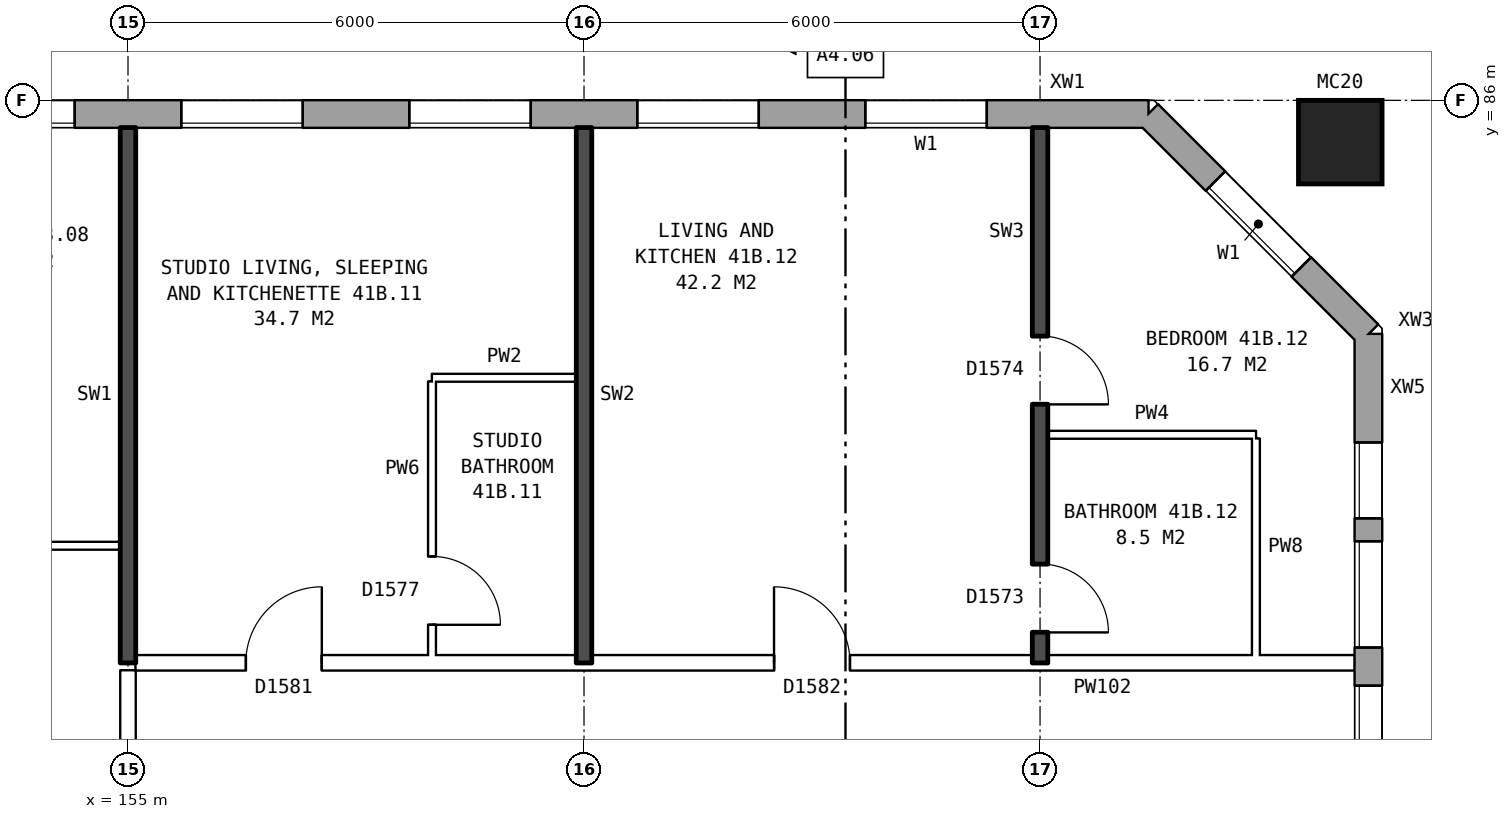
"""IFC4 building model, lengths in metres.
Left out: names, types, materials, properties, quantities, classifications, styles, units other than length and angle.
Written with IfcOpenShell. Run it as: python <this file> out.ifc"""

import sys

from ifc_helpers import new_model, si_unit, direction, frame, frame_2d, origin, origin_2d, place, context, subcontext, project, spatial, rectangle, hollow_rectangle, extrude, element, fill, save


model = new_model("IFC4")
c1 = context("Model", 3, precision=1e-05, world=origin(), true_north=direction((0.0, 1.0)))
c2 = subcontext(c1, "Body", "Model", "MODEL_VIEW")
j1 = project(units=[si_unit("LENGTHUNIT", "METRE"), si_unit("PLANEANGLEUNIT", "RADIAN")], contexts=[c1])
p1 = place(None, origin())
s1 = spatial("IfcSite", under=j1, at=p1, CompositionType="ELEMENT")
p2 = place(p1, origin())
s2 = spatial("IfcBuilding", under=s1, at=p2, CompositionType="ELEMENT")
p3 = place(p2, frame((0.0, 0.0, 148.5)))
s3 = spatial("IfcBuildingStorey", under=s2, at=p3, CompositionType="ELEMENT", Elevation=148.5)
p4 = place(p3, frame((170.95, 85.45, 0.0), z_axis=(0.0, 0.0, 1.0), x_axis=(1.0, 0.0, 0.0)))
e1 = element("IfcColumn", 1, at=p4, inside=s3, PredefinedType="COLUMN", context=c2, shape_type="SweptSolid", body=[
    extrude(hollow_rectangle(XDim=1.1, YDim=1.1, WallThickness=0.06, at=origin_2d()), origin(), (0.0, 0.0, 1.0), 3.1),
])
p5 = place(p3, frame((171.32, 57.075, 0.0), z_axis=(0.0, 0.0, 1.0), x_axis=(0.0, 1.0, 0.0)))
e2 = element("IfcWall", 2, at=p5, inside=s3, PredefinedType="STANDARD", context=c2, shape_type="SweptSolid", body=[
    extrude(rectangle(XDim=25.851, YDim=0.36, at=frame_2d((12.925, 0.0))), origin(), (0.0, 0.0, 1.0), 2.85),
])
p6 = place(p5, frame((1.4, 0.0, 0.8)))
e3 = element("IfcOpeningElement", 3, at=p6, cuts=e2, PredefinedType="OPENING", context=c2, shape_type="SweptSolid", body=[
    extrude(rectangle(XDim=1.0, YDim=1.2, at=frame_2d((0.5, 0.6))), frame((0.0, 0.19, 0.0), z_axis=(0.0, -1.0, 0.0), x_axis=(1.0, 0.0, 0.0)), (0.0, 0.0, 1.0), 0.38),
])
p7 = place(p5, frame((4.625, 0.0, 0.8)))
e4 = element("IfcOpeningElement", 4, at=p7, cuts=e2, PredefinedType="OPENING", context=c2, shape_type="SweptSolid", body=[
    extrude(rectangle(XDim=1.6, YDim=1.8, at=frame_2d((0.8, 0.9))), frame((0.0, 0.19, 0.0), z_axis=(0.0, -1.0, 0.0), x_axis=(1.0, 0.0, 0.0)), (0.0, 0.0, 1.0), 0.38),
])
p8 = place(p5, frame((7.625, 0.0, 0.8)))
e5 = element("IfcOpeningElement", 5, at=p8, cuts=e2, PredefinedType="OPENING", context=c2, shape_type="SweptSolid", body=[
    extrude(rectangle(XDim=1.6, YDim=1.8, at=frame_2d((0.8, 0.9))), frame((0.0, 0.19, 0.0), z_axis=(0.0, -1.0, 0.0), x_axis=(1.0, 0.0, 0.0)), (0.0, 0.0, 1.0), 0.38),
])
p9 = place(p5, frame((10.625, 0.0, 0.8)))
e6 = element("IfcOpeningElement", 6, at=p9, cuts=e2, PredefinedType="OPENING", context=c2, shape_type="SweptSolid", body=[
    extrude(rectangle(XDim=1.6, YDim=1.8, at=frame_2d((0.8, 0.9))), frame((0.0, 0.19, 0.0), z_axis=(0.0, -1.0, 0.0), x_axis=(1.0, 0.0, 0.0)), (0.0, 0.0, 1.0), 0.38),
])
p10 = place(p5, frame((13.625, 0.0, 0.8)))
e7 = element("IfcOpeningElement", 7, at=p10, cuts=e2, PredefinedType="OPENING", context=c2, shape_type="SweptSolid", body=[
    extrude(rectangle(XDim=1.6, YDim=1.8, at=frame_2d((0.8, 0.9))), frame((0.0, 0.19, 0.0), z_axis=(0.0, -1.0, 0.0), x_axis=(1.0, 0.0, 0.0)), (0.0, 0.0, 1.0), 0.38),
])
p11 = place(p5, frame((16.625, 0.0, 0.8)))
e8 = element("IfcOpeningElement", 8, at=p11, cuts=e2, PredefinedType="OPENING", context=c2, shape_type="SweptSolid", body=[
    extrude(rectangle(XDim=1.6, YDim=1.8, at=frame_2d((0.8, 0.9))), frame((0.0, 0.19, 0.0), z_axis=(0.0, -1.0, 0.0), x_axis=(1.0, 0.0, 0.0)), (0.0, 0.0, 1.0), 0.38),
])
p12 = place(p5, frame((19.625, 0.0, 0.8)))
e9 = element("IfcOpeningElement", 9, at=p12, cuts=e2, PredefinedType="OPENING", context=c2, shape_type="SweptSolid", body=[
    extrude(rectangle(XDim=1.6, YDim=1.8, at=frame_2d((0.8, 0.9))), frame((0.0, 0.19, 0.0), z_axis=(0.0, -1.0, 0.0), x_axis=(1.0, 0.0, 0.0)), (0.0, 0.0, 1.0), 0.38),
])
p13 = place(p5, frame((21.725, 0.0, 0.8)))
e10 = element("IfcOpeningElement", 10, at=p13, cuts=e2, PredefinedType="OPENING", context=c2, shape_type="SweptSolid", body=[
    extrude(rectangle(XDim=1.4, YDim=1.8, at=frame_2d((0.7, 0.9))), frame((0.0, 0.19, 0.0), z_axis=(0.0, -1.0, 0.0), x_axis=(1.0, 0.0, 0.0)), (0.0, 0.0, 1.0), 0.38),
])
p14 = place(p5, frame((2.7, 0.0, 0.8)))
e11 = element("IfcOpeningElement", 11, at=p14, cuts=e2, PredefinedType="OPENING", context=c2, shape_type="SweptSolid", body=[
    extrude(rectangle(XDim=1.4, YDim=1.8, at=frame_2d((0.7, 0.9))), frame((0.0, 0.19, 0.0), z_axis=(0.0, -1.0, 0.0), x_axis=(1.0, 0.0, 0.0)), (0.0, 0.0, 1.0), 0.38),
])
p15 = place(p5, frame((23.425, 0.0, 0.8)))
e12 = element("IfcOpeningElement", 12, at=p15, cuts=e2, PredefinedType="OPENING", context=c2, shape_type="SweptSolid", body=[
    extrude(rectangle(XDim=1.0, YDim=1.2, at=frame_2d((0.5, 0.6))), frame((0.0, 0.19, 0.0), z_axis=(0.0, -1.0, 0.0), x_axis=(1.0, 0.0, 0.0)), (0.0, 0.0, 1.0), 0.38),
])
p16 = place(p3, frame((171.32, 82.925, 0.0), z_axis=(0.0, 0.0, 1.0), x_axis=(-0.707106781187, 0.707106781187, 0.0)))
e13 = element("IfcWall", 13, at=p16, inside=s3, PredefinedType="STANDARD", context=c2, shape_type="SweptSolid", body=[
    extrude(rectangle(XDim=4.094, YDim=0.36, at=frame_2d((2.047, 0.0))), origin(), (0.0, 0.0, 1.0), 2.85),
])
p17 = place(p16, frame((1.247, 0.0, 0.8)))
e14 = element("IfcOpeningElement", 14, at=p17, cuts=e13, PredefinedType="OPENING", context=c2, shape_type="SweptSolid", body=[
    extrude(rectangle(XDim=1.6, YDim=1.8, at=frame_2d((0.8, 0.9))), frame((0.0, 0.19, 0.0), z_axis=(0.0, -1.0, 0.0), x_axis=(1.0, 0.0, 0.0)), (0.0, 0.0, 1.0), 0.38),
])
p18 = place(p3, frame((168.425, 85.82, 0.0), z_axis=(0.0, 0.0, 1.0), x_axis=(-1.0, 0.0, 0.0)))
e15 = element("IfcWall", 15, at=p18, inside=s3, PredefinedType="STANDARD", context=c2, shape_type="SweptSolid", body=[
    extrude(rectangle(XDim=34.351, YDim=0.36, at=frame_2d((17.175, 0.0))), origin(), (0.0, 0.0, 1.0), 2.85),
])
p19 = place(p18, frame((2.125, 0.0, 0.8)))
e16 = element("IfcOpeningElement", 16, at=p19, cuts=e15, PredefinedType="OPENING", context=c2, shape_type="SweptSolid", body=[
    extrude(rectangle(XDim=1.6, YDim=1.8, at=frame_2d((0.8, 0.9))), frame((0.0, 0.19, 0.0), z_axis=(0.0, -1.0, 0.0), x_axis=(1.0, 0.0, 0.0)), (0.0, 0.0, 1.0), 0.38),
])
p20 = place(p18, frame((5.125, 0.0, 0.8)))
e17 = element("IfcOpeningElement", 17, at=p20, cuts=e15, PredefinedType="OPENING", context=c2, shape_type="SweptSolid", body=[
    extrude(rectangle(XDim=1.6, YDim=1.8, at=frame_2d((0.8, 0.9))), frame((0.0, 0.19, 0.0), z_axis=(0.0, -1.0, 0.0), x_axis=(1.0, 0.0, 0.0)), (0.0, 0.0, 1.0), 0.38),
])
p21 = place(p18, frame((8.125, 0.0, 0.8)))
e18 = element("IfcOpeningElement", 18, at=p21, cuts=e15, PredefinedType="OPENING", context=c2, shape_type="SweptSolid", body=[
    extrude(rectangle(XDim=1.6, YDim=1.8, at=frame_2d((0.8, 0.9))), frame((0.0, 0.19, 0.0), z_axis=(0.0, -1.0, 0.0), x_axis=(1.0, 0.0, 0.0)), (0.0, 0.0, 1.0), 0.38),
])
p22 = place(p18, frame((11.125, 0.0, 0.8)))
e19 = element("IfcOpeningElement", 19, at=p22, cuts=e15, PredefinedType="OPENING", context=c2, shape_type="SweptSolid", body=[
    extrude(rectangle(XDim=1.6, YDim=1.8, at=frame_2d((0.8, 0.9))), frame((0.0, 0.19, 0.0), z_axis=(0.0, -1.0, 0.0), x_axis=(1.0, 0.0, 0.0)), (0.0, 0.0, 1.0), 0.38),
])
p23 = place(p18, frame((14.125, 0.0, 0.8)))
e20 = element("IfcOpeningElement", 20, at=p23, cuts=e15, PredefinedType="OPENING", context=c2, shape_type="SweptSolid", body=[
    extrude(rectangle(XDim=1.6, YDim=1.8, at=frame_2d((0.8, 0.9))), frame((0.0, 0.19, 0.0), z_axis=(0.0, -1.0, 0.0), x_axis=(1.0, 0.0, 0.0)), (0.0, 0.0, 1.0), 0.38),
])
p24 = place(p18, frame((17.125, 0.0, 0.8)))
e21 = element("IfcOpeningElement", 21, at=p24, cuts=e15, PredefinedType="OPENING", context=c2, shape_type="SweptSolid", body=[
    extrude(rectangle(XDim=1.6, YDim=1.8, at=frame_2d((0.8, 0.9))), frame((0.0, 0.19, 0.0), z_axis=(0.0, -1.0, 0.0), x_axis=(1.0, 0.0, 0.0)), (0.0, 0.0, 1.0), 0.38),
])
p25 = place(p18, frame((20.125, 0.0, 0.8)))
e22 = element("IfcOpeningElement", 22, at=p25, cuts=e15, PredefinedType="OPENING", context=c2, shape_type="SweptSolid", body=[
    extrude(rectangle(XDim=1.6, YDim=1.8, at=frame_2d((0.8, 0.9))), frame((0.0, 0.19, 0.0), z_axis=(0.0, -1.0, 0.0), x_axis=(1.0, 0.0, 0.0)), (0.0, 0.0, 1.0), 0.38),
])
p26 = place(p18, frame((23.125, 0.0, 0.8)))
e23 = element("IfcOpeningElement", 23, at=p26, cuts=e15, PredefinedType="OPENING", context=c2, shape_type="SweptSolid", body=[
    extrude(rectangle(XDim=1.6, YDim=1.8, at=frame_2d((0.8, 0.9))), frame((0.0, 0.19, 0.0), z_axis=(0.0, -1.0, 0.0), x_axis=(1.0, 0.0, 0.0)), (0.0, 0.0, 1.0), 0.38),
])
p27 = place(p18, frame((26.125, 0.0, 0.8)))
e24 = element("IfcOpeningElement", 24, at=p27, cuts=e15, PredefinedType="OPENING", context=c2, shape_type="SweptSolid", body=[
    extrude(rectangle(XDim=1.6, YDim=1.8, at=frame_2d((0.8, 0.9))), frame((0.0, 0.19, 0.0), z_axis=(0.0, -1.0, 0.0), x_axis=(1.0, 0.0, 0.0)), (0.0, 0.0, 1.0), 0.38),
])
p28 = place(p18, frame((29.125, 0.0, 0.8)))
e25 = element("IfcOpeningElement", 25, at=p28, cuts=e15, PredefinedType="OPENING", context=c2, shape_type="SweptSolid", body=[
    extrude(rectangle(XDim=1.6, YDim=1.8, at=frame_2d((0.8, 0.9))), frame((0.0, 0.19, 0.0), z_axis=(0.0, -1.0, 0.0), x_axis=(1.0, 0.0, 0.0)), (0.0, 0.0, 1.0), 0.38),
])
p29 = place(p18, frame((32.125, 0.0, 0.8)))
e26 = element("IfcOpeningElement", 26, at=p29, cuts=e15, PredefinedType="OPENING", context=c2, shape_type="SweptSolid", body=[
    extrude(rectangle(XDim=1.6, YDim=1.8, at=frame_2d((0.8, 0.9))), frame((0.0, 0.19, 0.0), z_axis=(0.0, -1.0, 0.0), x_axis=(1.0, 0.0, 0.0)), (0.0, 0.0, 1.0), 0.38),
])
p30 = place(p3, frame((155.1, 78.6, 0.0), z_axis=(0.0, 0.0, 1.0), x_axis=(1.0, 0.0, 0.0)))
e27 = element("IfcWall", 27, at=p30, inside=s3, PredefinedType="PARTITIONING", context=c2, shape_type="SweptSolid", body=[
    extrude(rectangle(XDim=16.04, YDim=0.2, at=frame_2d((8.02, 0.0))), origin(), (0.0, 0.0, 1.0), 2.85),
])
p31 = place(p30, frame((1.45, 0.0, 0.0)))
e28 = element("IfcOpeningElement", 28, at=p31, cuts=e27, PredefinedType="OPENING", context=c2, shape_type="SweptSolid", body=[
    extrude(rectangle(XDim=1.0, YDim=2.1, at=frame_2d((0.5, 1.05))), frame((0.0, 0.11, 0.0), z_axis=(0.0, -1.0, 0.0), x_axis=(1.0, 0.0, 0.0)), (0.0, 0.0, 1.0), 0.22),
])
p32 = place(p30, frame((8.4, 0.0, 0.0)))
e29 = element("IfcOpeningElement", 29, at=p32, cuts=e27, PredefinedType="OPENING", context=c2, shape_type="SweptSolid", body=[
    extrude(rectangle(XDim=1.0, YDim=2.1, at=frame_2d((0.5, 1.05))), frame((0.0, 0.11, 0.0), z_axis=(0.0, -1.0, 0.0), x_axis=(1.0, 0.0, 0.0)), (0.0, 0.0, 1.0), 0.22),
])
p33 = place(p3, frame((152.0, 80.14, 0.0), z_axis=(0.0, 0.0, 1.0), x_axis=(1.0, 0.0, 0.0)))
e30 = element("IfcWall", 30, at=p33, inside=s3, PredefinedType="PARTITIONING", context=c2, shape_type="SweptSolid", body=[
    extrude(rectangle(XDim=2.9, YDim=0.1, at=frame_2d((1.45, 0.0))), origin(), (0.0, 0.0, 1.0), 2.85),
])
p34 = place(p33, frame((1.0, 0.0, 0.0)))
e31 = element("IfcOpeningElement", 31, at=p34, cuts=e30, PredefinedType="OPENING", context=c2, shape_type="SweptSolid", body=[
    extrude(rectangle(XDim=0.9, YDim=2.1, at=frame_2d((0.45, 1.05))), frame((0.0, 0.06, 0.0), z_axis=(0.0, -1.0, 0.0), x_axis=(1.0, 0.0, 0.0)), (0.0, 0.0, 1.0), 0.12),
])
p35 = place(p3, frame((167.1, 81.6, 0.0), z_axis=(0.0, 0.0, 1.0), x_axis=(1.0, 0.0, 0.0)))
e32 = element("IfcWall", 32, at=p35, inside=s3, PredefinedType="PARTITIONING", context=c2, shape_type="SweptSolid", body=[
    extrude(rectangle(XDim=2.74, YDim=0.1, at=frame_2d((1.37, 0.0))), origin(), (0.0, 0.0, 1.0), 2.85),
])
p36 = place(p3, frame((159.0, 82.35, 0.0), z_axis=(0.0, 0.0, 1.0), x_axis=(1.0, 0.0, 0.0)))
e33 = element("IfcWall", 33, at=p36, inside=s3, PredefinedType="PARTITIONING", context=c2, shape_type="SweptSolid", body=[
    extrude(rectangle(XDim=1.9, YDim=0.1, at=frame_2d((0.95, 0.0))), origin(), (0.0, 0.0, 1.0), 2.85),
])
p37 = place(p3, frame((155.0, 76.3, 0.0), z_axis=(0.0, 0.0, 1.0), x_axis=(0.0, 1.0, 0.0)))
e34 = element("IfcWall", 34, at=p37, inside=s3, PredefinedType="PARTITIONING", context=c2, shape_type="SweptSolid", body=[
    extrude(rectangle(XDim=2.2, YDim=0.2, at=frame_2d((1.1, 0.0))), origin(), (0.0, 0.0, 1.0), 2.85),
])
p38 = place(p3, frame((155.0, 78.6, 0.0), z_axis=(0.0, 0.0, 1.0), x_axis=(0.0, 1.0, 0.0)))
e35 = element("IfcWall", 35, at=p38, inside=s3, PredefinedType="SOLIDWALL", context=c2, shape_type="SweptSolid", body=[
    extrude(rectangle(XDim=7.04, YDim=0.2, at=frame_2d((3.52, 0.0))), origin(), (0.0, 0.0, 1.0), 2.85),
])
p39 = place(p3, frame((159.0, 78.7, 0.0), z_axis=(0.0, 0.0, 1.0), x_axis=(0.0, 1.0, 0.0)))
e36 = element("IfcWall", 36, at=p39, inside=s3, PredefinedType="PARTITIONING", context=c2, shape_type="SweptSolid", body=[
    extrude(rectangle(XDim=3.6, YDim=0.1, at=frame_2d((1.8, 0.0))), origin(), (0.0, 0.0, 1.0), 2.85),
])
p40 = place(p39, frame((0.4, 0.0, 0.0)))
e37 = element("IfcOpeningElement", 37, at=p40, cuts=e36, PredefinedType="OPENING", context=c2, shape_type="SweptSolid", body=[
    extrude(rectangle(XDim=0.9, YDim=2.1, at=frame_2d((0.45, 1.05))), frame((0.0, 0.06, 0.0), z_axis=(0.0, -1.0, 0.0), x_axis=(1.0, 0.0, 0.0)), (0.0, 0.0, 1.0), 0.12),
])
p41 = place(p3, frame((161.0, 78.6, 0.0), z_axis=(0.0, 0.0, 1.0), x_axis=(0.0, 1.0, 0.0)))
e38 = element("IfcWall", 38, at=p41, inside=s3, PredefinedType="SOLIDWALL", context=c2, shape_type="SweptSolid", body=[
    extrude(rectangle(XDim=7.04, YDim=0.2, at=frame_2d((3.52, 0.0))), origin(), (0.0, 0.0, 1.0), 2.85),
])
p42 = place(p3, frame((167.0, 78.6, 0.0), z_axis=(0.0, 0.0, 1.0), x_axis=(0.0, 1.0, 0.0)))
e39 = element("IfcWall", 39, at=p42, inside=s3, PredefinedType="SOLIDWALL", context=c2, shape_type="SweptSolid", body=[
    extrude(rectangle(XDim=7.04, YDim=0.2, at=frame_2d((3.52, 0.0))), origin(), (0.0, 0.0, 1.0), 2.85),
])
p43 = place(p42, frame((3.4, 0.0, 0.0)))
e40 = element("IfcOpeningElement", 40, at=p43, cuts=e39, PredefinedType="OPENING", context=c2, shape_type="SweptSolid", body=[
    extrude(rectangle(XDim=0.9, YDim=2.1, at=frame_2d((0.45, 1.05))), frame((0.0, 0.11, 0.0), z_axis=(0.0, -1.0, 0.0), x_axis=(1.0, 0.0, 0.0)), (0.0, 0.0, 1.0), 0.22),
])
p44 = place(p42, frame((0.4, 0.0, 0.0)))
e41 = element("IfcOpeningElement", 41, at=p44, cuts=e39, PredefinedType="OPENING", context=c2, shape_type="SweptSolid", body=[
    extrude(rectangle(XDim=0.9, YDim=2.1, at=frame_2d((0.45, 1.05))), frame((0.0, 0.11, 0.0), z_axis=(0.0, -1.0, 0.0), x_axis=(1.0, 0.0, 0.0)), (0.0, 0.0, 1.0), 0.22),
])
p45 = place(p3, frame((169.84, 78.7, 0.0), z_axis=(0.0, 0.0, 1.0), x_axis=(0.0, 1.0, 0.0)))
e42 = element("IfcWall", 42, at=p45, inside=s3, PredefinedType="PARTITIONING", context=c2, shape_type="SweptSolid", body=[
    extrude(rectangle(XDim=2.85, YDim=0.1, at=frame_2d((1.425, 0.0))), origin(), (0.0, 0.0, 1.0), 2.85),
])
p46 = place(p12, origin())
e43 = element("IfcWindow", 43, at=p46, inside=s3, PartitioningType="SINGLE_PANEL", PredefinedType="WINDOW", context=c2, shape_type="SweptSolid", body=[
    extrude(rectangle(XDim=1.6, YDim=1.8, at=frame_2d((0.8, 0.9))), frame((0.0, 0.15, 0.0), z_axis=(0.0, -1.0, 0.0), x_axis=(1.0, 0.0, 0.0)), (0.0, 0.0, 1.0), 0.06),
])
fill(e9, e43)
p47 = place(p13, origin())
e44 = element("IfcWindow", 44, at=p47, inside=s3, PartitioningType="SINGLE_PANEL", PredefinedType="WINDOW", context=c2, shape_type="SweptSolid", body=[
    extrude(rectangle(XDim=1.4, YDim=1.8, at=frame_2d((0.7, 0.9))), frame((0.0, 0.15, 0.0), z_axis=(0.0, -1.0, 0.0), x_axis=(1.0, 0.0, 0.0)), (0.0, 0.0, 1.0), 0.06),
])
fill(e10, e44)
p48 = place(p17, origin())
e45 = element("IfcWindow", 45, at=p48, inside=s3, PartitioningType="SINGLE_PANEL", PredefinedType="WINDOW", context=c2, shape_type="SweptSolid", body=[
    extrude(rectangle(XDim=1.6, YDim=1.8, at=frame_2d((0.8, 0.9))), frame((0.0, 0.15, 0.0), z_axis=(0.0, -1.0, 0.0), x_axis=(1.0, 0.0, 0.0)), (0.0, 0.0, 1.0), 0.06),
])
fill(e14, e45)
p49 = place(p19, origin())
e46 = element("IfcWindow", 46, at=p49, inside=s3, PartitioningType="SINGLE_PANEL", PredefinedType="WINDOW", context=c2, shape_type="SweptSolid", body=[
    extrude(rectangle(XDim=1.6, YDim=1.8, at=frame_2d((0.8, 0.9))), frame((0.0, 0.15, 0.0), z_axis=(0.0, -1.0, 0.0), x_axis=(1.0, 0.0, 0.0)), (0.0, 0.0, 1.0), 0.06),
])
fill(e16, e46)
p50 = place(p20, origin())
e47 = element("IfcWindow", 47, at=p50, inside=s3, PartitioningType="SINGLE_PANEL", PredefinedType="WINDOW", context=c2, shape_type="SweptSolid", body=[
    extrude(rectangle(XDim=1.6, YDim=1.8, at=frame_2d((0.8, 0.9))), frame((0.0, 0.15, 0.0), z_axis=(0.0, -1.0, 0.0), x_axis=(1.0, 0.0, 0.0)), (0.0, 0.0, 1.0), 0.06),
])
fill(e17, e47)
p51 = place(p21, origin())
e48 = element("IfcWindow", 48, at=p51, inside=s3, PartitioningType="SINGLE_PANEL", PredefinedType="WINDOW", context=c2, shape_type="SweptSolid", body=[
    extrude(rectangle(XDim=1.6, YDim=1.8, at=frame_2d((0.8, 0.9))), frame((0.0, 0.15, 0.0), z_axis=(0.0, -1.0, 0.0), x_axis=(1.0, 0.0, 0.0)), (0.0, 0.0, 1.0), 0.06),
])
fill(e18, e48)
p52 = place(p22, origin())
e49 = element("IfcWindow", 49, at=p52, inside=s3, PartitioningType="SINGLE_PANEL", PredefinedType="WINDOW", context=c2, shape_type="SweptSolid", body=[
    extrude(rectangle(XDim=1.6, YDim=1.8, at=frame_2d((0.8, 0.9))), frame((0.0, 0.15, 0.0), z_axis=(0.0, -1.0, 0.0), x_axis=(1.0, 0.0, 0.0)), (0.0, 0.0, 1.0), 0.06),
])
fill(e19, e49)
p53 = place(p23, origin())
e50 = element("IfcWindow", 50, at=p53, inside=s3, PartitioningType="SINGLE_PANEL", PredefinedType="WINDOW", context=c2, shape_type="SweptSolid", body=[
    extrude(rectangle(XDim=1.6, YDim=1.8, at=frame_2d((0.8, 0.9))), frame((0.0, 0.15, 0.0), z_axis=(0.0, -1.0, 0.0), x_axis=(1.0, 0.0, 0.0)), (0.0, 0.0, 1.0), 0.06),
])
fill(e20, e50)
p54 = place(p31, origin())
e51 = element("IfcDoor", 51, at=p54, inside=s3, OperationType="SINGLE_SWING_RIGHT", PredefinedType="DOOR", context=c2, shape_type="SweptSolid", body=[
    extrude(rectangle(XDim=1.0, YDim=2.1, at=frame_2d((0.5, 1.05))), frame((0.0, 0.025, 0.0), z_axis=(0.0, -1.0, 0.0), x_axis=(1.0, 0.0, 0.0)), (0.0, 0.0, 1.0), 0.05),
])
fill(e28, e51)
p55 = place(p40, frame((0.9, 0.0, 0.0), z_axis=(0.0, 0.0, 1.0), x_axis=(-1.0, 0.0, 0.0)))
e52 = element("IfcDoor", 52, at=p55, inside=s3, OperationType="SINGLE_SWING_RIGHT", PredefinedType="DOOR", context=c2, shape_type="SweptSolid", body=[
    extrude(rectangle(XDim=0.9, YDim=2.1, at=frame_2d((0.45, 1.05))), frame((0.0, 0.025, 0.0), z_axis=(0.0, -1.0, 0.0), x_axis=(1.0, 0.0, 0.0)), (0.0, 0.0, 1.0), 0.05),
])
fill(e37, e52)
p56 = place(p43, frame((0.9, 0.0, 0.0), z_axis=(0.0, 0.0, 1.0), x_axis=(-1.0, 0.0, 0.0)))
e53 = element("IfcDoor", 53, at=p56, inside=s3, OperationType="SINGLE_SWING_RIGHT", PredefinedType="DOOR", context=c2, shape_type="SweptSolid", body=[
    extrude(rectangle(XDim=0.9, YDim=2.1, at=frame_2d((0.45, 1.05))), frame((0.0, 0.025, 0.0), z_axis=(0.0, -1.0, 0.0), x_axis=(1.0, 0.0, 0.0)), (0.0, 0.0, 1.0), 0.05),
])
fill(e40, e53)
p57 = place(p32, origin())
e54 = element("IfcDoor", 54, at=p57, inside=s3, OperationType="SINGLE_SWING_LEFT", PredefinedType="DOOR", context=c2, shape_type="SweptSolid", body=[
    extrude(rectangle(XDim=1.0, YDim=2.1, at=frame_2d((0.5, 1.05))), frame((0.0, 0.025, 0.0), z_axis=(0.0, -1.0, 0.0), x_axis=(1.0, 0.0, 0.0)), (0.0, 0.0, 1.0), 0.05),
])
fill(e29, e54)
p58 = place(p44, frame((0.9, 0.0, 0.0), z_axis=(0.0, 0.0, 1.0), x_axis=(-1.0, 0.0, 0.0)))
e55 = element("IfcDoor", 55, at=p58, inside=s3, OperationType="SINGLE_SWING_RIGHT", PredefinedType="DOOR", context=c2, shape_type="SweptSolid", body=[
    extrude(rectangle(XDim=0.9, YDim=2.1, at=frame_2d((0.45, 1.05))), frame((0.0, 0.025, 0.0), z_axis=(0.0, -1.0, 0.0), x_axis=(1.0, 0.0, 0.0)), (0.0, 0.0, 1.0), 0.05),
])
fill(e41, e55)
p59 = place(p15, origin())
e56 = element("IfcWindow", 56, at=p59, inside=s3, PartitioningType="SINGLE_PANEL", PredefinedType="WINDOW", context=c2, shape_type="SweptSolid", body=[
    extrude(rectangle(XDim=1.0, YDim=1.2, at=frame_2d((0.5, 0.6))), frame((0.0, 0.15, 0.0), z_axis=(0.0, -1.0, 0.0), x_axis=(1.0, 0.0, 0.0)), (0.0, 0.0, 1.0), 0.06),
])
fill(e12, e56)
save(model, sys.argv[1])
